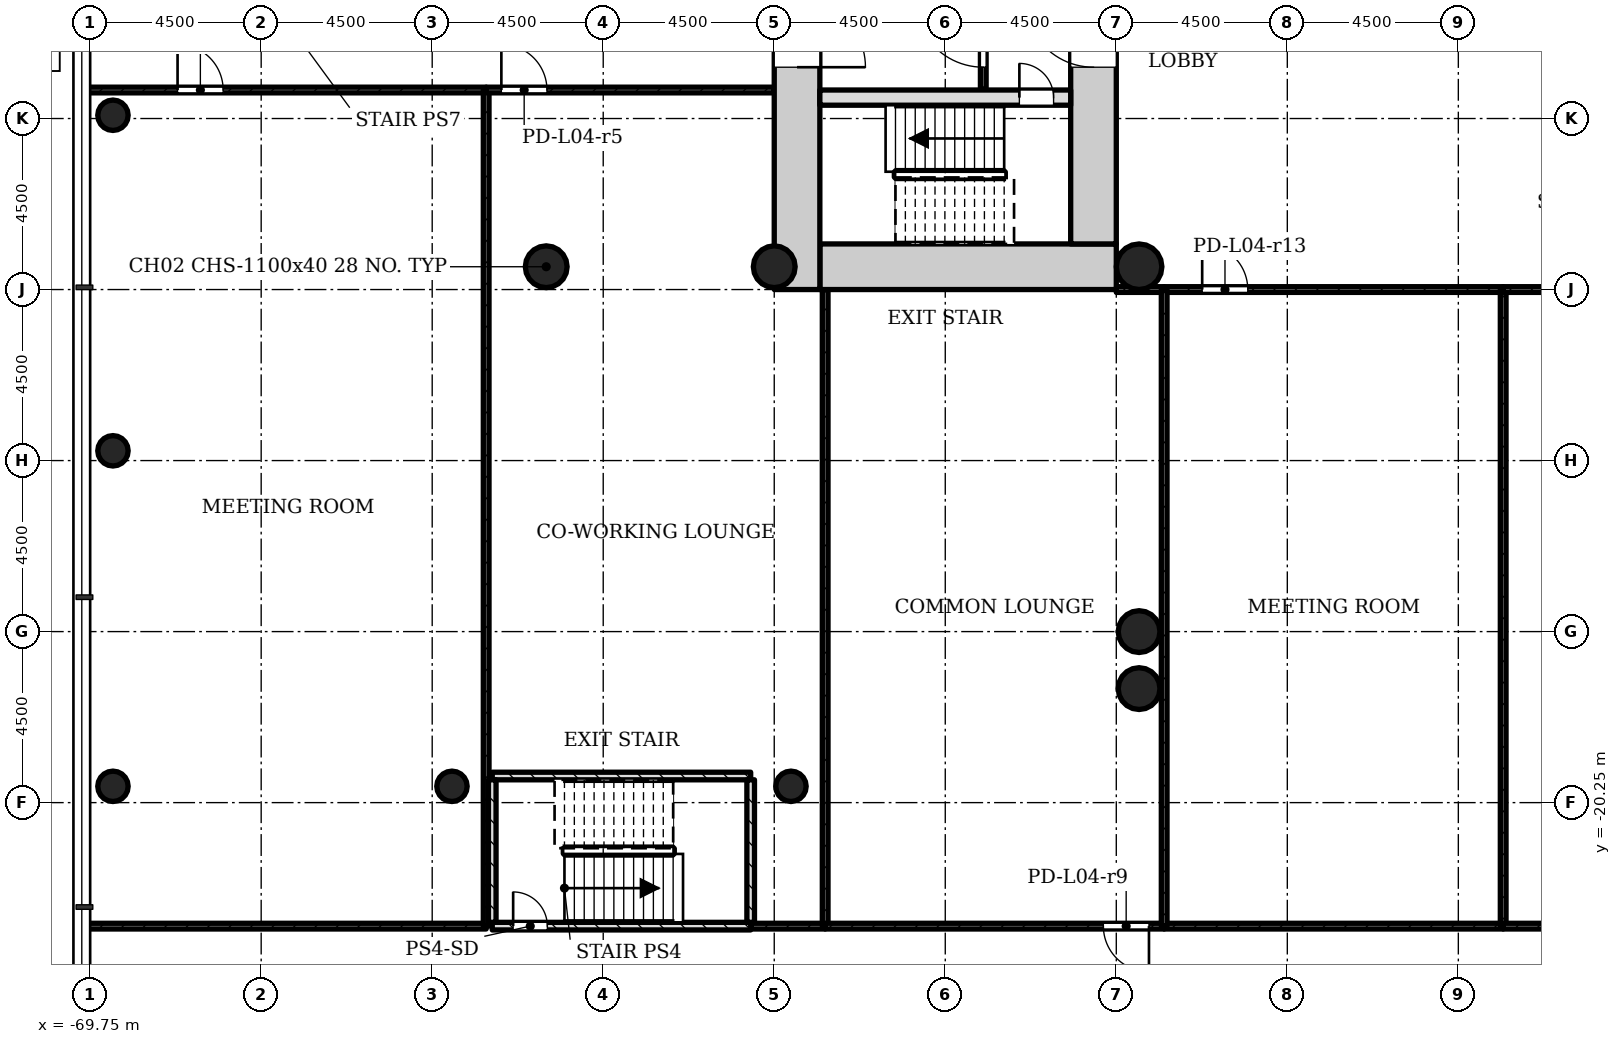
"""IFC4 building model, lengths in metres.
Left out: names, types, materials, properties, quantities, classifications, styles, units other than length and angle.
Written with IfcOpenShell. Run it as: python <this file> out.ifc"""

import sys

from ifc_helpers import new_model, si_unit, direction, frame, frame_2d, origin, origin_2d, place, context, subcontext, project, spatial, rectangle, hollow_circle, extrude, element, fill, save


model = new_model("IFC4")
c1 = context("Model", 3, precision=1e-05, world=origin(), true_north=direction((0.0, 1.0)))
c2 = subcontext(c1, "Body", "Model", "MODEL_VIEW")
j1 = project(units=[si_unit("LENGTHUNIT", "METRE"), si_unit("PLANEANGLEUNIT", "RADIAN")], contexts=[c1])
p1 = place(None, origin())
s1 = spatial("IfcSite", under=j1, at=p1, CompositionType="ELEMENT")
p2 = place(p1, origin())
s2 = spatial("IfcBuilding", under=s1, at=p2, CompositionType="ELEMENT")
p3 = place(p2, frame((0.0, 0.0, 20.0)))
s3 = spatial("IfcBuildingStorey", under=s2, at=p3, CompositionType="ELEMENT", Elevation=20.0)
p4 = place(p3, frame((-50.55, -6.15, 0.0), z_axis=(0.0, 0.0, 1.0), x_axis=(1.0, 0.0, 0.0)))
e1 = element("IfcWall", 1, at=p4, inside=s3, PredefinedType="SHEAR", context=c2, shape_type="SweptSolid", body=[
    extrude(rectangle(XDim=7.8, YDim=1.2, at=frame_2d((3.9, 0.0))), origin(), (0.0, 0.0, 1.0), 4.5),
])
p5 = place(p3, frame((-43.35, -5.55, 0.0), z_axis=(0.0, 0.0, 1.0), x_axis=(0.0, 1.0, 0.0)))
e2 = element("IfcWall", 2, at=p5, inside=s3, PredefinedType="SHEAR", context=c2, shape_type="SweptSolid", body=[
    extrude(rectangle(XDim=12.3, YDim=1.2, at=frame_2d((6.15, 0.0))), origin(), (0.0, 0.0, 1.0), 4.5),
])
p6 = place(p5, frame((4.65, 0.0, 0.0)))
e3 = element("IfcOpeningElement", 3, at=p6, cuts=e2, PredefinedType="OPENING", context=c2, shape_type="SweptSolid", body=[
    extrude(rectangle(XDim=1.8, YDim=2.1, at=frame_2d((0.9, 1.05))), frame((0.0, 0.61, 0.0), z_axis=(0.0, -1.0, 0.0), x_axis=(1.0, 0.0, 0.0)), (0.0, 0.0, 1.0), 1.22),
])
p7 = place(p3, frame((-51.15, 5.55, 0.0), z_axis=(0.0, 0.0, 1.0), x_axis=(0.0, -1.0, 0.0)))
e4 = element("IfcWall", 4, at=p7, inside=s3, PredefinedType="SHEAR", context=c2, shape_type="SweptSolid", body=[
    extrude(rectangle(XDim=12.3, YDim=1.2, at=frame_2d((6.15, 0.0))), origin(), (0.0, 0.0, 1.0), 4.5),
])
p8 = place(p7, frame((4.65, 0.0, 0.0)))
e5 = element("IfcOpeningElement", 5, at=p8, cuts=e4, PredefinedType="OPENING", context=c2, shape_type="SweptSolid", body=[
    extrude(rectangle(XDim=1.8, YDim=2.1, at=frame_2d((0.9, 1.05))), frame((0.0, 0.61, 0.0), z_axis=(0.0, -1.0, 0.0), x_axis=(1.0, 0.0, 0.0)), (0.0, 0.0, 1.0), 1.22),
])
p9 = place(p3, frame((-50.55, -1.7, 0.0), z_axis=(0.0, 0.0, 1.0), x_axis=(1.0, 0.0, 0.0)))
e6 = element("IfcWall", 6, at=p9, inside=s3, PredefinedType="SHEAR", context=c2, shape_type="SweptSolid", body=[
    extrude(rectangle(XDim=6.6, YDim=0.4, at=frame_2d((3.3, 0.0))), origin(), (0.0, 0.0, 1.0), 4.5),
])
p10 = place(p9, frame((5.25, 0.0, 0.0)))
e7 = element("IfcOpeningElement", 7, at=p10, cuts=e6, PredefinedType="OPENING", context=c2, shape_type="SweptSolid", body=[
    extrude(rectangle(XDim=0.9, YDim=2.1, at=frame_2d((0.45, 1.05))), frame((0.0, 0.21, 0.0), z_axis=(0.0, -1.0, 0.0), x_axis=(1.0, 0.0, 0.0)), (0.0, 0.0, 1.0), 0.42),
])
for number, where, z_axis, x_axis in (
    (8, (-51.75, -6.15, 0.0), (0.0, 0.0, 1.0), (1.0, 0.0, 0.0)),
    (9, (-57.75, -6.15, 0.0), (0.0, 0.0, 1.0), (1.0, 0.0, 0.0)),
    (10, (-42.15, -15.75, 0.0), (0.0, 0.0, 1.0), (1.0, 0.0, 0.0)),
    (11, (-42.15, -17.25, 0.0), (0.0, 0.0, 1.0), (1.0, 0.0, 0.0)),
):
    element("IfcColumn", number, at=place(p3, frame(where, z_axis=z_axis, x_axis=x_axis)), inside=s3, PredefinedType="COLUMN", context=c2, shape_type="SweptSolid", body=[
        extrude(hollow_circle(Radius=0.55, WallThickness=0.04, at=origin_2d()), origin(), (0.0, 0.0, 1.0), 4.5),
    ])
p11 = place(p3, frame((-42.15, -6.15, 0.0), z_axis=(0.0, 0.0, 1.0), x_axis=(1.0, 0.0, 0.0)))
e12 = element("IfcColumn", 12, at=p11, inside=s3, PredefinedType="COLUMN", context=c2, shape_type="SweptSolid", body=[
    extrude(hollow_circle(Radius=0.6, WallThickness=0.045, at=origin_2d()), origin(), (0.0, 0.0, 1.0), 4.5),
])
for number, where, z_axis, x_axis in (
    (13, (-69.15, -19.821, 0.0), (0.0, 0.0, 1.0), (1.0, 0.0, 0.0)),
    (14, (-60.23, -19.821, 0.0), (0.0, 0.0, 1.0), (1.0, 0.0, 0.0)),
    (15, (-51.31, -19.821, 0.0), (0.0, 0.0, 1.0), (1.0, 0.0, 0.0)),
    (16, (-69.15, -10.993, 0.0), (0.0, 0.0, 1.0), (1.0, 0.0, 0.0)),
    (17, (-69.15, -2.164, 0.0), (0.0, 0.0, 1.0), (1.0, 0.0, 0.0)),
):
    element("IfcColumn", number, at=place(p3, frame(where, z_axis=z_axis, x_axis=x_axis)), inside=s3, PredefinedType="COLUMN", context=c2, shape_type="SweptSolid", body=[
        extrude(hollow_circle(Radius=0.4, WallThickness=0.028, at=origin_2d()), origin(), (0.0, 0.0, 1.0), 4.08),
    ])
p12 = place(p3, frame((-46.25, 1.5, 0.0), z_axis=(0.0, 0.0, 1.0), x_axis=(0.0, -1.0, 0.0)))
e18 = element("IfcWall", 18, at=p12, inside=s3, PredefinedType="PARTITIONING", context=c2, shape_type="SweptSolid", body=[
    extrude(rectangle(XDim=3.0, YDim=0.15, at=frame_2d((1.5, 0.0))), origin(), (0.0, 0.0, 1.0), 4.075),
])
p13 = place(p12, frame((0.6, 0.0, 0.0)))
e19 = element("IfcOpeningElement", 19, at=p13, cuts=e18, PredefinedType="OPENING", context=c2, shape_type="SweptSolid", body=[
    extrude(rectangle(XDim=1.8, YDim=2.1, at=frame_2d((0.9, 1.05))), frame((0.0, 0.085, 0.0), z_axis=(0.0, -1.0, 0.0), x_axis=(1.0, 0.0, 0.0)), (0.0, 0.0, 1.0), 0.17),
])
p14 = place(p3, frame((-69.85, -1.5, 0.0), z_axis=(0.0, 0.0, 1.0), x_axis=(1.0, 0.0, 0.0)))
e20 = element("IfcWall", 20, at=p14, inside=s3, PredefinedType="PARTITIONING", context=c2, shape_type="SweptSolid", body=[
    extrude(rectangle(XDim=10.52, YDim=0.15, at=frame_2d((5.26, 0.0))), origin(), (0.0, 0.0, 1.0), 4.075),
])
p15 = place(p14, frame((2.4, 0.0, 0.0)))
e21 = element("IfcOpeningElement", 21, at=p15, cuts=e20, PredefinedType="OPENING", context=c2, shape_type="SweptSolid", body=[
    extrude(rectangle(XDim=1.2, YDim=2.1, at=frame_2d((0.6, 1.05))), frame((0.0, 0.085, 0.0), z_axis=(0.0, -1.0, 0.0), x_axis=(1.0, 0.0, 0.0)), (0.0, 0.0, 1.0), 0.17),
])
p16 = place(p3, frame((-59.33, -23.5, 0.0), z_axis=(0.0, 0.0, 1.0), x_axis=(-1.0, 0.0, 0.0)))
e22 = element("IfcWall", 22, at=p16, inside=s3, PredefinedType="PARTITIONING", context=c2, shape_type="SweptSolid", body=[
    extrude(rectangle(XDim=10.52, YDim=0.15, at=frame_2d((5.26, 0.0))), origin(), (0.0, 0.0, 1.0), 4.075),
])
p17 = place(p3, frame((-59.33, -1.5, 0.0), z_axis=(0.0, 0.0, 1.0), x_axis=(0.0, -1.0, 0.0)))
e23 = element("IfcWall", 23, at=p17, inside=s3, PredefinedType="PARTITIONING", context=c2, shape_type="SweptSolid", body=[
    extrude(rectangle(XDim=22.0, YDim=0.15, at=frame_2d((11.0, 0.0))), origin(), (0.0, 0.0, 1.0), 4.075),
])
p18 = place(p3, frame((-59.33, -1.5, 0.0), z_axis=(0.0, 0.0, 1.0), x_axis=(1.0, 0.0, 0.0)))
e24 = element("IfcWall", 24, at=p18, inside=s3, PredefinedType="PARTITIONING", context=c2, shape_type="SweptSolid", body=[
    extrude(rectangle(XDim=7.58, YDim=0.15, at=frame_2d((3.79, 0.0))), origin(), (0.0, 0.0, 1.0), 4.075),
])
p19 = place(p18, frame((0.4, 0.0, 0.0)))
e25 = element("IfcOpeningElement", 25, at=p19, cuts=e24, PredefinedType="OPENING", context=c2, shape_type="SweptSolid", body=[
    extrude(rectangle(XDim=1.2, YDim=2.1, at=frame_2d((0.6, 1.05))), frame((0.0, 0.085, 0.0), z_axis=(0.0, -1.0, 0.0), x_axis=(1.0, 0.0, 0.0)), (0.0, 0.0, 1.0), 0.17),
])
p20 = place(p3, frame((-50.41, -23.5, 0.0), z_axis=(0.0, 0.0, 1.0), x_axis=(-1.0, 0.0, 0.0)))
e26 = element("IfcWall", 26, at=p20, inside=s3, PredefinedType="PARTITIONING", context=c2, shape_type="SweptSolid", body=[
    extrude(rectangle(XDim=1.96, YDim=0.15, at=frame_2d((0.98, 0.0))), origin(), (0.0, 0.0, 1.0), 4.075),
])
p21 = place(p3, frame((-50.41, -6.75, 0.0), z_axis=(0.0, 0.0, 1.0), x_axis=(0.0, -1.0, 0.0)))
e27 = element("IfcWall", 27, at=p21, inside=s3, PredefinedType="PARTITIONING", context=c2, shape_type="SweptSolid", body=[
    extrude(rectangle(XDim=16.75, YDim=0.15, at=frame_2d((8.375, 0.0))), origin(), (0.0, 0.0, 1.0), 4.075),
])
p22 = place(p3, frame((-42.75, -6.75, 0.0), z_axis=(0.0, 0.0, 1.0), x_axis=(1.0, 0.0, 0.0)))
e28 = element("IfcWall", 28, at=p22, inside=s3, PredefinedType="PARTITIONING", context=c2, shape_type="SweptSolid", body=[
    extrude(rectangle(XDim=1.26, YDim=0.15, at=frame_2d((0.63, 0.0))), origin(), (0.0, 0.0, 1.0), 4.075),
])
p23 = place(p3, frame((-41.49, -23.5, 0.0), z_axis=(0.0, 0.0, 1.0), x_axis=(-1.0, 0.0, 0.0)))
e29 = element("IfcWall", 29, at=p23, inside=s3, PredefinedType="PARTITIONING", context=c2, shape_type="SweptSolid", body=[
    extrude(rectangle(XDim=8.92, YDim=0.15, at=frame_2d((4.46, 0.0))), origin(), (0.0, 0.0, 1.0), 4.075),
])
p24 = place(p23, frame((0.4, 0.0, 0.0)))
e30 = element("IfcOpeningElement", 30, at=p24, cuts=e29, PredefinedType="OPENING", context=c2, shape_type="SweptSolid", body=[
    extrude(rectangle(XDim=1.2, YDim=2.1, at=frame_2d((0.6, 1.05))), frame((0.0, 0.085, 0.0), z_axis=(0.0, -1.0, 0.0), x_axis=(1.0, 0.0, 0.0)), (0.0, 0.0, 1.0), 0.17),
])
p25 = place(p3, frame((-41.49, -6.75, 0.0), z_axis=(0.0, 0.0, 1.0), x_axis=(1.0, 0.0, 0.0)))
e31 = element("IfcWall", 31, at=p25, inside=s3, PredefinedType="PARTITIONING", context=c2, shape_type="SweptSolid", body=[
    extrude(rectangle(XDim=8.92, YDim=0.15, at=frame_2d((4.46, 0.0))), origin(), (0.0, 0.0, 1.0), 4.075),
])
p26 = place(p25, frame((1.0, 0.0, 0.0)))
e32 = element("IfcOpeningElement", 32, at=p26, cuts=e31, PredefinedType="OPENING", context=c2, shape_type="SweptSolid", body=[
    extrude(rectangle(XDim=1.2, YDim=2.1, at=frame_2d((0.6, 1.05))), frame((0.0, 0.085, 0.0), z_axis=(0.0, -1.0, 0.0), x_axis=(1.0, 0.0, 0.0)), (0.0, 0.0, 1.0), 0.17),
])
p27 = place(p3, frame((-32.57, -23.5, 0.0), z_axis=(0.0, 0.0, 1.0), x_axis=(-1.0, 0.0, 0.0)))
e33 = element("IfcWall", 33, at=p27, inside=s3, PredefinedType="PARTITIONING", context=c2, shape_type="SweptSolid", body=[
    extrude(rectangle(XDim=8.92, YDim=0.15, at=frame_2d((4.46, 0.0))), origin(), (0.0, 0.0, 1.0), 4.075),
])
for number, where, z_axis, x_axis in (
    (34, (-41.49, -23.5, 0.0), (0.0, 0.0, 1.0), (0.0, 1.0, 0.0)),
    (35, (-32.57, -6.75, 0.0), (0.0, 0.0, 1.0), (0.0, -1.0, 0.0)),
):
    element("IfcWall", number, at=place(p3, frame(where, z_axis=z_axis, x_axis=x_axis)), inside=s3, PredefinedType="PARTITIONING", context=c2, shape_type="SweptSolid", body=[
        extrude(rectangle(XDim=16.75, YDim=0.15, at=frame_2d((8.375, 0.0))), origin(), (0.0, 0.0, 1.0), 4.075),
    ])
p28 = place(p3, frame((-32.57, -6.75, 0.0), z_axis=(0.0, 0.0, 1.0), x_axis=(1.0, 0.0, 0.0)))
e36 = element("IfcWall", 36, at=p28, inside=s3, PredefinedType="PARTITIONING", context=c2, shape_type="SweptSolid", body=[
    extrude(rectangle(XDim=3.32, YDim=0.15, at=frame_2d((1.66, 0.0))), origin(), (0.0, 0.0, 1.0), 4.075),
])
p29 = place(p3, frame((-23.65, -23.5, 0.0), z_axis=(0.0, 0.0, 1.0), x_axis=(-1.0, 0.0, 0.0)))
e37 = element("IfcWall", 37, at=p29, inside=s3, PredefinedType="PARTITIONING", context=c2, shape_type="SweptSolid", body=[
    extrude(rectangle(XDim=8.92, YDim=0.15, at=frame_2d((4.46, 0.0))), origin(), (0.0, 0.0, 1.0), 4.075),
])
p30 = place(p29, frame((0.4, 0.0, 0.0)))
e38 = element("IfcOpeningElement", 38, at=p30, cuts=e37, PredefinedType="OPENING", context=c2, shape_type="SweptSolid", body=[
    extrude(rectangle(XDim=1.2, YDim=2.1, at=frame_2d((0.6, 1.05))), frame((0.0, 0.085, 0.0), z_axis=(0.0, -1.0, 0.0), x_axis=(1.0, 0.0, 0.0)), (0.0, 0.0, 1.0), 0.17),
])
p31 = place(p3, frame((-59.17, -23.5, 0.0), z_axis=(0.0, 0.0, 1.0), x_axis=(1.0, 0.0, 0.0)))
e39 = element("IfcWall", 39, at=p31, inside=s3, PredefinedType="SHEAR", context=c2, shape_type="SweptSolid", body=[
    extrude(rectangle(XDim=6.8, YDim=0.2, at=frame_2d((3.4, 0.0))), origin(), (0.0, 0.0, 1.0), 4.075),
])
p32 = place(p31, frame((0.55, 0.0, 0.0)))
e40 = element("IfcOpeningElement", 40, at=p32, cuts=e39, PredefinedType="OPENING", context=c2, shape_type="SweptSolid", body=[
    extrude(rectangle(XDim=0.9, YDim=2.1, at=frame_2d((0.45, 1.05))), frame((0.0, 0.11, 0.0), z_axis=(0.0, -1.0, 0.0), x_axis=(1.0, 0.0, 0.0)), (0.0, 0.0, 1.0), 0.22),
])
p33 = place(p3, frame((-59.17, -19.55, 0.0), z_axis=(0.0, 0.0, 1.0), x_axis=(1.0, 0.0, 0.0)))
e41 = element("IfcWall", 41, at=p33, inside=s3, PredefinedType="SHEAR", context=c2, shape_type="SweptSolid", body=[
    extrude(rectangle(XDim=6.8, YDim=0.2, at=frame_2d((3.4, 0.0))), origin(), (0.0, 0.0, 1.0), 4.075),
])
for number, where, z_axis, x_axis in (
    (42, (-59.17, -23.4, 0.0), (0.0, 0.0, 1.0), (0.0, 1.0, 0.0)),
    (43, (-52.37, -23.4, 0.0), (0.0, 0.0, 1.0), (0.0, 1.0, 0.0)),
):
    element("IfcWall", number, at=place(p3, frame(where, z_axis=z_axis, x_axis=x_axis)), inside=s3, PredefinedType="SHEAR", context=c2, shape_type="SweptSolid", body=[
        extrude(rectangle(XDim=3.75, YDim=0.2, at=frame_2d((1.875, 0.0))), origin(), (0.0, 0.0, 1.0), 4.075),
    ])
p34 = place(p13, origin())
e44 = element("IfcDoor", 44, at=p34, inside=s3, OperationType="SINGLE_SWING_LEFT", PredefinedType="DOOR", context=c2, shape_type="SweptSolid", body=[
    extrude(rectangle(XDim=1.8, YDim=2.1, at=frame_2d((0.9, 1.05))), frame((0.0, 0.025, 0.0), z_axis=(0.0, -1.0, 0.0), x_axis=(1.0, 0.0, 0.0)), (0.0, 0.0, 1.0), 0.05),
])
fill(e19, e44)
p35 = place(p15, origin())
e45 = element("IfcDoor", 45, at=p35, inside=s3, OperationType="SINGLE_SWING_RIGHT", PredefinedType="DOOR", context=c2, shape_type="SweptSolid", body=[
    extrude(rectangle(XDim=1.2, YDim=2.1, at=frame_2d((0.6, 1.05))), frame((0.0, 0.025, 0.0), z_axis=(0.0, -1.0, 0.0), x_axis=(1.0, 0.0, 0.0)), (0.0, 0.0, 1.0), 0.05),
])
fill(e21, e45)
p36 = place(p19, origin())
e46 = element("IfcDoor", 46, at=p36, inside=s3, OperationType="SINGLE_SWING_RIGHT", PredefinedType="DOOR", context=c2, shape_type="SweptSolid", body=[
    extrude(rectangle(XDim=1.2, YDim=2.1, at=frame_2d((0.6, 1.05))), frame((0.0, 0.025, 0.0), z_axis=(0.0, -1.0, 0.0), x_axis=(1.0, 0.0, 0.0)), (0.0, 0.0, 1.0), 0.05),
])
fill(e25, e46)
p37 = place(p24, origin())
e47 = element("IfcDoor", 47, at=p37, inside=s3, OperationType="SINGLE_SWING_RIGHT", PredefinedType="DOOR", context=c2, shape_type="SweptSolid", body=[
    extrude(rectangle(XDim=1.2, YDim=2.1, at=frame_2d((0.6, 1.05))), frame((0.0, 0.025, 0.0), z_axis=(0.0, -1.0, 0.0), x_axis=(1.0, 0.0, 0.0)), (0.0, 0.0, 1.0), 0.05),
])
fill(e30, e47)
p38 = place(p26, origin())
e48 = element("IfcDoor", 48, at=p38, inside=s3, OperationType="SINGLE_SWING_RIGHT", PredefinedType="DOOR", context=c2, shape_type="SweptSolid", body=[
    extrude(rectangle(XDim=1.2, YDim=2.1, at=frame_2d((0.6, 1.05))), frame((0.0, 0.025, 0.0), z_axis=(0.0, -1.0, 0.0), x_axis=(1.0, 0.0, 0.0)), (0.0, 0.0, 1.0), 0.05),
])
fill(e32, e48)
p39 = place(p32, origin())
e49 = element("IfcDoor", 49, at=p39, inside=s3, OperationType="SINGLE_SWING_RIGHT", PredefinedType="DOOR", context=c2, shape_type="SweptSolid", body=[
    extrude(rectangle(XDim=0.9, YDim=2.1, at=frame_2d((0.45, 1.05))), frame((0.0, 0.025, 0.0), z_axis=(0.0, -1.0, 0.0), x_axis=(1.0, 0.0, 0.0)), (0.0, 0.0, 1.0), 0.05),
])
fill(e40, e49)
p40 = place(p10, origin())
e50 = element("IfcDoor", 50, at=p40, inside=s3, OperationType="SINGLE_SWING_RIGHT", PredefinedType="DOOR", context=c2, shape_type="SweptSolid", body=[
    extrude(rectangle(XDim=0.9, YDim=2.1, at=frame_2d((0.45, 1.05))), frame((0.0, 0.025, 0.0), z_axis=(0.0, -1.0, 0.0), x_axis=(1.0, 0.0, 0.0)), (0.0, 0.0, 1.0), 0.05),
])
fill(e7, e50)
p41 = place(p6, origin())
e51 = element("IfcDoor", 51, at=p41, inside=s3, OperationType="SINGLE_SWING_LEFT", PredefinedType="DOOR", context=c2, shape_type="SweptSolid", body=[
    extrude(rectangle(XDim=1.8, YDim=2.1, at=frame_2d((0.9, 1.05))), frame((0.0, 0.025, 0.0), z_axis=(0.0, -1.0, 0.0), x_axis=(1.0, 0.0, 0.0)), (0.0, 0.0, 1.0), 0.05),
])
fill(e3, e51)
p42 = place(p8, origin())
e52 = element("IfcDoor", 52, at=p42, inside=s3, OperationType="SINGLE_SWING_LEFT", PredefinedType="DOOR", context=c2, shape_type="SweptSolid", body=[
    extrude(rectangle(XDim=1.8, YDim=2.1, at=frame_2d((0.9, 1.05))), frame((0.0, 0.025, 0.0), z_axis=(0.0, -1.0, 0.0), x_axis=(1.0, 0.0, 0.0)), (0.0, 0.0, 1.0), 0.05),
])
fill(e5, e52)
save(model, sys.argv[1])
